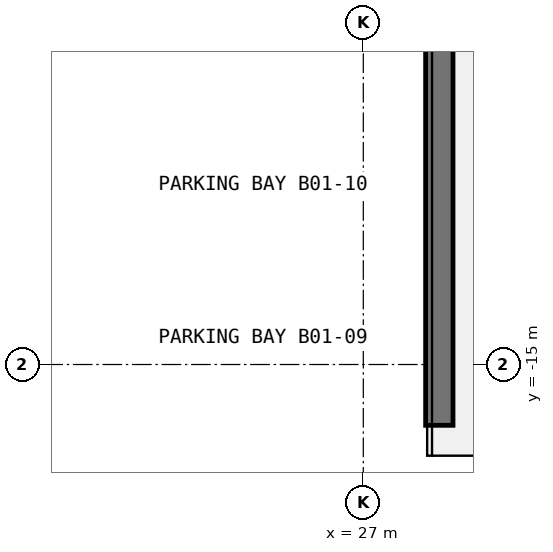
"""IFC4 building model, lengths in metres.
Left out: names, types, materials, properties, quantities, classifications, styles, units other than length and angle.
Written with IfcOpenShell. Run it as: python <this file> out.ifc"""

import sys

from ifc_helpers import new_model, si_unit, direction, frame, frame_2d, origin, place, context, subcontext, project, spatial, rectangle, extrude, element, save


model = new_model("IFC4")
c1 = context("Model", 3, precision=1e-05, world=origin(), true_north=direction((0.0, 1.0)))
c2 = subcontext(c1, "Body", "Model", "MODEL_VIEW")
j1 = project(units=[si_unit("LENGTHUNIT", "METRE"), si_unit("PLANEANGLEUNIT", "RADIAN")], contexts=[c1])
p1 = place(None, origin())
s1 = spatial("IfcSite", under=j1, at=p1, CompositionType="ELEMENT")
p2 = place(p1, origin())
s2 = spatial("IfcBuilding", under=s1, at=p2, CompositionType="ELEMENT")
p3 = place(p2, frame((0.0, 0.0, -4.5)))
s3 = spatial("IfcBuildingStorey", under=s2, at=p3, CompositionType="ELEMENT", Elevation=-4.5)
p4 = place(p3, frame((28.25, -16.0, 0.0), z_axis=(0.0, 0.0, 1.0), x_axis=(0.0, 1.0, 0.0)))
e1 = element("IfcWall", 1, at=p4, inside=s3, PredefinedType="SHEAR", context=c2, shape_type="SweptSolid", body=[
    extrude(rectangle(XDim=32.0, YDim=0.45, at=frame_2d((16.0, 0.0))), origin(), (0.0, 0.0, 1.0), 1.97),
])
save(model, sys.argv[1])
